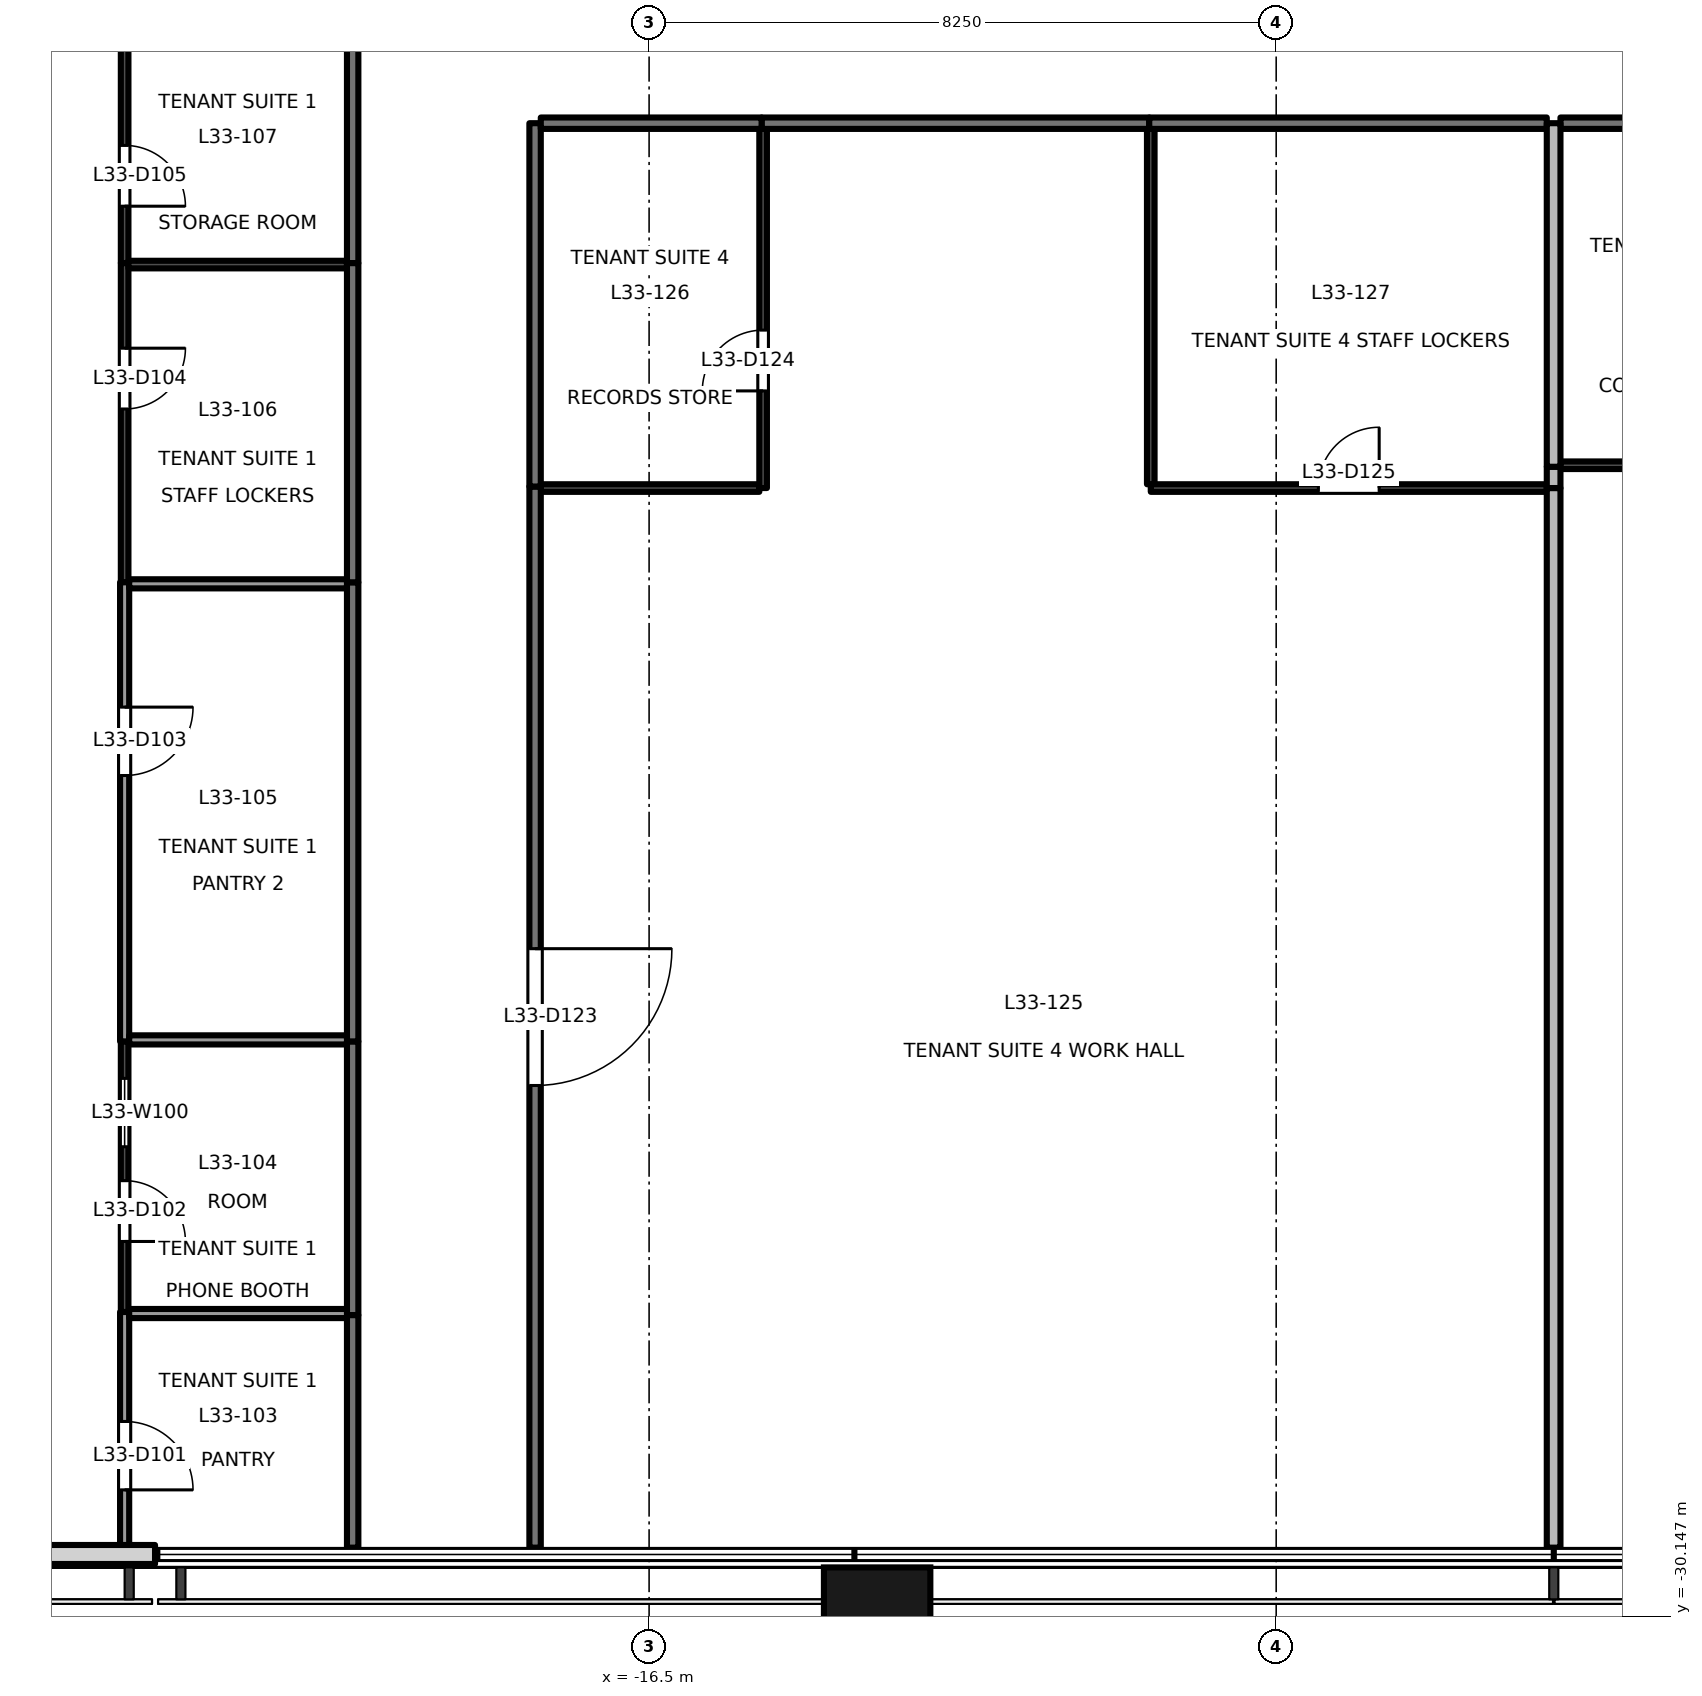
"""IFC4 building model, lengths in metres.
Left out: names, types, materials, properties, quantities, classifications, styles, units other than length and angle.
Written with IfcOpenShell. Run it as: python <this file> out.ifc"""

import sys

from ifc_helpers import new_model, si_unit, direction, frame, frame_2d, origin, origin_2d, place, context, subcontext, project, spatial, rectangle, extrude, element, fill, save


model = new_model("IFC4")
c1 = context("Model", 3, precision=1e-05, world=origin(), true_north=direction((0.0, 1.0)))
c2 = subcontext(c1, "Body", "Model", "MODEL_VIEW")
j1 = project(units=[si_unit("LENGTHUNIT", "METRE"), si_unit("PLANEANGLEUNIT", "RADIAN")], contexts=[c1])
p1 = place(None, origin())
s1 = spatial("IfcSite", under=j1, at=p1, CompositionType="ELEMENT")
p2 = place(p1, origin())
s2 = spatial("IfcBuilding", under=s1, at=p2, CompositionType="ELEMENT")
p3 = place(p2, frame((0.0, 0.0, 146.1)))
s3 = spatial("IfcBuildingStorey", under=s2, at=p3, CompositionType="ELEMENT", Elevation=146.1)
p4 = place(p3, frame((-13.5, -30.4, -0.2), z_axis=(0.0, 0.0, 1.0), x_axis=(1.0, 0.0, 0.0)))
e1 = element("IfcColumn", 1, at=p4, inside=s3, PredefinedType="COLUMN", context=c2, shape_type="SweptSolid", body=[
    extrude(rectangle(XDim=1.4, YDim=1.8, at=origin_2d()), origin(), (0.0, 0.0, 1.0), 4.0),
])
p5 = place(p3, frame((-25.955, -29.33, 0.0), z_axis=(0.0, 0.0, 1.0), x_axis=(1.0, 0.0, 0.0)))
e2 = element("IfcWall", 2, at=p5, inside=s3, PredefinedType="SOLIDWALL", context=c2, shape_type="SweptSolid", body=[
    extrude(rectangle(XDim=2.955, YDim=0.25, at=frame_2d((1.478, 0.0))), origin(), (0.0, 0.0, 1.0), 3.8),
])
p6 = place(p3, frame((-20.4, -29.24, 0.0), z_axis=(0.0, 0.0, 1.0), x_axis=(0.0, 1.0, 0.0)))
e3 = element("IfcWall", 3, at=p6, inside=s3, PredefinedType="PARTITIONING", context=c2, shape_type="SweptSolid", body=[
    extrude(rectangle(XDim=3.06, YDim=0.15, at=frame_2d((1.53, 0.0))), origin(), (0.0, 0.0, 1.0), 3.8),
])
p7 = place(p3, frame((-20.4, -26.18, 0.0), z_axis=(0.0, 0.0, 1.0), x_axis=(0.0, 1.0, 0.0)))
e4 = element("IfcWall", 4, at=p7, inside=s3, PredefinedType="PARTITIONING", context=c2, shape_type="SweptSolid", body=[
    extrude(rectangle(XDim=3.6, YDim=0.15, at=frame_2d((1.8, 0.0))), origin(), (0.0, 0.0, 1.0), 3.8),
])
p8 = place(p3, frame((-20.4, -22.58, 0.0), z_axis=(0.0, 0.0, 1.0), x_axis=(0.0, 1.0, 0.0)))
e5 = element("IfcWall", 5, at=p8, inside=s3, PredefinedType="PARTITIONING", context=c2, shape_type="SweptSolid", body=[
    extrude(rectangle(XDim=6.04, YDim=0.15, at=frame_2d((3.02, 0.0))), origin(), (0.0, 0.0, 1.0), 3.8),
])
p9 = place(p3, frame((-20.4, -16.54, 0.0), z_axis=(0.0, 0.0, 1.0), x_axis=(0.0, 1.0, 0.0)))
e6 = element("IfcWall", 6, at=p9, inside=s3, PredefinedType="PARTITIONING", context=c2, shape_type="SweptSolid", body=[
    extrude(rectangle(XDim=4.2, YDim=0.15, at=frame_2d((2.1, 0.0))), origin(), (0.0, 0.0, 1.0), 3.8),
])
p10 = place(p3, frame((-20.4, -12.34, 0.0), z_axis=(0.0, 0.0, 1.0), x_axis=(0.0, 1.0, 0.0)))
e7 = element("IfcWall", 7, at=p10, inside=s3, PredefinedType="PARTITIONING", context=c2, shape_type="SweptSolid", body=[
    extrude(rectangle(XDim=2.96, YDim=0.15, at=frame_2d((1.48, 0.0))), origin(), (0.0, 0.0, 1.0), 3.8),
])
p11 = place(p3, frame((-18.0, -15.28, 0.0), z_axis=(0.0, 0.0, 1.0), x_axis=(0.0, -1.0, 0.0)))
e8 = element("IfcWall", 8, at=p11, inside=s3, PredefinedType="PARTITIONING", context=c2, shape_type="SweptSolid", body=[
    extrude(rectangle(XDim=13.96, YDim=0.15, at=frame_2d((6.98, 0.0))), origin(), (0.0, 0.0, 1.0), 3.8),
])
p12 = place(p11, frame((6.08, 0.0, 0.0)))
e9 = element("IfcOpeningElement", 9, at=p12, cuts=e8, PredefinedType="OPENING", context=c2, shape_type="SweptSolid", body=[
    extrude(rectangle(XDim=1.8, YDim=2.1, at=frame_2d((0.9, 1.05))), frame((0.0, 0.085, 0.0), z_axis=(0.0, -1.0, 0.0), x_axis=(1.0, 0.0, 0.0)), (0.0, 0.0, 1.0), 0.171),
])
p13 = place(p3, frame((-9.92, -10.5, 0.0), z_axis=(0.0, 0.0, 1.0), x_axis=(-1.0, 0.0, 0.0)))
e10 = element("IfcWall", 10, at=p13, inside=s3, PredefinedType="PARTITIONING", context=c2, shape_type="SweptSolid", body=[
    extrude(rectangle(XDim=5.1, YDim=0.15, at=frame_2d((2.55, 0.0))), origin(), (0.0, 0.0, 1.0), 2.9),
])
p14 = place(p3, frame((-18.0, -10.5, 0.0), z_axis=(0.0, 0.0, 1.0), x_axis=(0.0, -1.0, 0.0)))
e11 = element("IfcWall", 11, at=p14, inside=s3, PredefinedType="PARTITIONING", context=c2, shape_type="SweptSolid", body=[
    extrude(rectangle(XDim=4.78, YDim=0.15, at=frame_2d((2.39, 0.0))), origin(), (0.0, 0.0, 1.0), 3.8),
])
p15 = place(p3, frame((-15.02, -10.5, 0.0), z_axis=(0.0, 0.0, 1.0), x_axis=(-1.0, 0.0, 0.0)))
e12 = element("IfcWall", 12, at=p15, inside=s3, PredefinedType="PARTITIONING", context=c2, shape_type="SweptSolid", body=[
    extrude(rectangle(XDim=2.905, YDim=0.15, at=frame_2d((1.453, 0.0))), origin(), (0.0, 0.0, 1.0), 3.8),
])
p16 = place(p3, frame((-4.69, -10.5, 0.0), z_axis=(0.0, 0.0, 1.0), x_axis=(-1.0, 0.0, 0.0)))
e13 = element("IfcWall", 13, at=p16, inside=s3, PredefinedType="PARTITIONING", context=c2, shape_type="SweptSolid", body=[
    extrude(rectangle(XDim=5.23, YDim=0.15, at=frame_2d((2.615, 0.0))), origin(), (0.0, 0.0, 1.0), 2.9),
])
p17 = place(p3, frame((-1.62, -10.5, 0.0), z_axis=(0.0, 0.0, 1.0), x_axis=(-1.0, 0.0, 0.0)))
e14 = element("IfcWall", 14, at=p17, inside=s3, PredefinedType="PARTITIONING", context=c2, shape_type="SweptSolid", body=[
    extrude(rectangle(XDim=2.89, YDim=0.15, at=frame_2d((1.445, 0.0))), origin(), (0.0, 0.0, 1.0), 2.9),
])
p18 = place(p3, frame((-23.4, -26.14, 0.0), z_axis=(0.0, 0.0, 1.0), x_axis=(0.0, -1.0, 0.0)))
e15 = element("IfcWall", 15, at=p18, inside=s3, PredefinedType="PARTITIONING", context=c2, shape_type="SweptSolid", body=[
    extrude(rectangle(XDim=3.1, YDim=0.12, at=frame_2d((1.55, 0.0))), origin(), (0.0, 0.0, 1.0), 3.8),
])
p19 = place(p18, frame((1.44, 0.0, 0.0)))
e16 = element("IfcOpeningElement", 16, at=p19, cuts=e15, PredefinedType="OPENING", context=c2, shape_type="SweptSolid", body=[
    extrude(rectangle(XDim=0.9, YDim=2.1, at=frame_2d((0.45, 1.05))), frame((0.0, 0.071, 0.0), z_axis=(0.0, -1.0, 0.0), x_axis=(1.0, 0.0, 0.0)), (0.0, 0.0, 1.0), 0.141),
])
p20 = place(p3, frame((-23.4, -22.58, 0.0), z_axis=(0.0, 0.0, 1.0), x_axis=(0.0, -1.0, 0.0)))
e17 = element("IfcWall", 17, at=p20, inside=s3, PredefinedType="PARTITIONING", context=c2, shape_type="SweptSolid", body=[
    extrude(rectangle(XDim=3.56, YDim=0.1, at=frame_2d((1.78, 0.0))), origin(), (0.0, 0.0, 1.0), 3.8),
])
p21 = place(p20, frame((1.832, 0.0, 0.0)))
e18 = element("IfcOpeningElement", 18, at=p21, cuts=e17, PredefinedType="OPENING", context=c2, shape_type="SweptSolid", body=[
    extrude(rectangle(XDim=0.8, YDim=2.1, at=frame_2d((0.4, 1.05))), frame((0.0, 0.061, 0.0), z_axis=(0.0, -1.0, 0.0), x_axis=(1.0, 0.0, 0.0)), (0.0, 0.0, 1.0), 0.121),
])
p22 = place(p20, frame((0.486, 0.0, 0.9)))
e19 = element("IfcOpeningElement", 19, at=p22, cuts=e17, PredefinedType="OPENING", context=c2, shape_type="SweptSolid", body=[
    extrude(rectangle(XDim=0.9, YDim=1.2, at=frame_2d((0.45, 0.6))), frame((0.0, 0.061, 0.0), z_axis=(0.0, -1.0, 0.0), x_axis=(1.0, 0.0, 0.0)), (0.0, 0.0, 1.0), 0.121),
])
p23 = place(p3, frame((-23.4, -16.54, 0.0), z_axis=(0.0, 0.0, 1.0), x_axis=(0.0, -1.0, 0.0)))
e20 = element("IfcWall", 20, at=p23, inside=s3, PredefinedType="PARTITIONING", context=c2, shape_type="SweptSolid", body=[
    extrude(rectangle(XDim=6.04, YDim=0.12, at=frame_2d((3.02, 0.0))), origin(), (0.0, 0.0, 1.0), 3.8),
])
p24 = place(p23, frame((1.642, 0.0, 0.0)))
e21 = element("IfcOpeningElement", 21, at=p24, cuts=e20, PredefinedType="OPENING", context=c2, shape_type="SweptSolid", body=[
    extrude(rectangle(XDim=0.9, YDim=2.1, at=frame_2d((0.45, 1.05))), frame((0.0, 0.071, 0.0), z_axis=(0.0, -1.0, 0.0), x_axis=(1.0, 0.0, 0.0)), (0.0, 0.0, 1.0), 0.141),
])
p25 = place(p3, frame((-23.4, -12.34, 0.0), z_axis=(0.0, 0.0, 1.0), x_axis=(0.0, -1.0, 0.0)))
e22 = element("IfcWall", 22, at=p25, inside=s3, PredefinedType="PARTITIONING", context=c2, shape_type="SweptSolid", body=[
    extrude(rectangle(XDim=4.2, YDim=0.1, at=frame_2d((2.1, 0.0))), origin(), (0.0, 0.0, 1.0), 3.8),
])
p26 = place(p25, frame((1.12, 0.0, 0.0)))
e23 = element("IfcOpeningElement", 23, at=p26, cuts=e22, PredefinedType="OPENING", context=c2, shape_type="SweptSolid", body=[
    extrude(rectangle(XDim=0.8, YDim=2.1, at=frame_2d((0.4, 1.05))), frame((0.0, 0.061, 0.0), z_axis=(0.0, -1.0, 0.0), x_axis=(1.0, 0.0, 0.0)), (0.0, 0.0, 1.0), 0.121),
])
p27 = place(p3, frame((-23.4, -9.38, 0.0), z_axis=(0.0, 0.0, 1.0), x_axis=(0.0, -1.0, 0.0)))
e24 = element("IfcWall", 24, at=p27, inside=s3, PredefinedType="PARTITIONING", context=c2, shape_type="SweptSolid", body=[
    extrude(rectangle(XDim=2.96, YDim=0.1, at=frame_2d((1.48, 0.0))), origin(), (0.0, 0.0, 1.0), 3.8),
])
p28 = place(p27, frame((1.412, 0.0, 0.0)))
e25 = element("IfcOpeningElement", 25, at=p28, cuts=e24, PredefinedType="OPENING", context=c2, shape_type="SweptSolid", body=[
    extrude(rectangle(XDim=0.8, YDim=2.1, at=frame_2d((0.4, 1.05))), frame((0.0, 0.061, 0.0), z_axis=(0.0, -1.0, 0.0), x_axis=(1.0, 0.0, 0.0)), (0.0, 0.0, 1.0), 0.121),
])
for number, where, z_axis, x_axis in (
    (26, (-23.34, -26.16, 0.0), (0.0, 0.0, 1.0), (1.0, 0.0, 0.0)),
    (27, (-23.34, -22.56, 0.0), (0.0, 0.0, 1.0), (1.0, 0.0, 0.0)),
    (28, (-23.34, -16.56, 0.0), (0.0, 0.0, 1.0), (1.0, 0.0, 0.0)),
):
    element("IfcWall", number, at=place(p3, frame(where, z_axis=z_axis, x_axis=x_axis)), inside=s3, PredefinedType="PARTITIONING", context=c2, shape_type="SweptSolid", body=[
        extrude(rectangle(XDim=2.865, YDim=0.12, at=frame_2d((1.433, 0.0))), origin(), (0.0, 0.0, 1.0), 3.8),
    ])
for number, where, z_axis, x_axis in (
    (29, (-23.35, -12.36, 0.0), (0.0, 0.0, 1.0), (1.0, 0.0, 0.0)),
    (30, (-17.925, -15.3, 0.0), (0.0, 0.0, 1.0), (1.0, 0.0, 0.0)),
):
    element("IfcWall", number, at=place(p3, frame(where, z_axis=z_axis, x_axis=x_axis)), inside=s3, PredefinedType="PARTITIONING", context=c2, shape_type="SweptSolid", body=[
        extrude(rectangle(XDim=2.875, YDim=0.1, at=frame_2d((1.438, 0.0))), origin(), (0.0, 0.0, 1.0), 3.8),
    ])
p29 = place(p3, frame((-15.0, -15.3, 0.0), z_axis=(0.0, 0.0, 1.0), x_axis=(0.0, 1.0, 0.0)))
e31 = element("IfcWall", 31, at=p29, inside=s3, PredefinedType="PARTITIONING", context=c2, shape_type="SweptSolid", body=[
    extrude(rectangle(XDim=4.725, YDim=0.1, at=frame_2d((2.363, 0.0))), origin(), (0.0, 0.0, 1.0), 3.8),
])
p30 = place(p29, frame((1.278, 0.0, 0.0)))
e32 = element("IfcOpeningElement", 32, at=p30, cuts=e31, PredefinedType="OPENING", context=c2, shape_type="SweptSolid", body=[
    extrude(rectangle(XDim=0.8, YDim=2.1, at=frame_2d((0.4, 1.05))), frame((0.0, 0.061, 0.0), z_axis=(0.0, -1.0, 0.0), x_axis=(1.0, 0.0, 0.0)), (0.0, 0.0, 1.0), 0.121),
])
p31 = place(p3, frame((-9.9, -10.575, 0.0), z_axis=(0.0, 0.0, 1.0), x_axis=(0.0, -1.0, 0.0)))
e33 = element("IfcWall", 33, at=p31, inside=s3, PredefinedType="PARTITIONING", context=c2, shape_type="SweptSolid", body=[
    extrude(rectangle(XDim=4.675, YDim=0.1, at=frame_2d((2.337, 0.0))), origin(), (0.0, 0.0, 1.0), 3.8),
])
p32 = place(p3, frame((-9.9, -15.3, 0.0), z_axis=(0.0, 0.0, 1.0), x_axis=(1.0, 0.0, 0.0)))
e34 = element("IfcWall", 34, at=p32, inside=s3, PredefinedType="PARTITIONING", context=c2, shape_type="SweptSolid", body=[
    extrude(rectangle(XDim=5.21, YDim=0.1, at=frame_2d((2.605, 0.0))), origin(), (0.0, 0.0, 1.0), 2.9),
])
p33 = place(p32, frame((2.205, 0.0, 0.0)))
e35 = element("IfcOpeningElement", 35, at=p33, cuts=e34, PredefinedType="OPENING", context=c2, shape_type="SweptSolid", body=[
    extrude(rectangle(XDim=0.8, YDim=2.1, at=frame_2d((0.4, 1.05))), frame((0.0, 0.061, 0.0), z_axis=(0.0, -1.0, 0.0), x_axis=(1.0, 0.0, 0.0)), (0.0, 0.0, 1.0), 0.121),
])
p34 = place(p3, frame((-4.6, -15.3, 0.0), z_axis=(0.0, 0.0, 1.0), x_axis=(0.0, -1.0, 0.0)))
e36 = element("IfcWall", 36, at=p34, inside=s3, PredefinedType="PARTITIONING", context=c2, shape_type="SweptSolid", body=[
    extrude(rectangle(XDim=13.94, YDim=0.18, at=frame_2d((6.97, 0.0))), origin(), (0.0, 0.0, 1.0), 2.9),
])
p35 = place(p3, frame((-4.6, -15.02, 0.0), z_axis=(0.0, 0.0, 1.0), x_axis=(0.0, -1.0, 0.0)))
e37 = element("IfcWall", 37, at=p35, inside=s3, PredefinedType="PARTITIONING", context=c2, shape_type="SweptSolid", body=[
    extrude(rectangle(XDim=0.28, YDim=0.18, at=frame_2d((0.14, 0.0))), origin(), (0.0, 0.0, 1.0), 2.9),
])
p36 = place(p3, frame((-4.6, -10.5, 0.0), z_axis=(0.0, 0.0, 1.0), x_axis=(0.0, -1.0, 0.0)))
e38 = element("IfcWall", 38, at=p36, inside=s3, PredefinedType="PARTITIONING", context=c2, shape_type="SweptSolid", body=[
    extrude(rectangle(XDim=4.52, YDim=0.18, at=frame_2d((2.26, 0.0))), origin(), (0.0, 0.0, 1.0), 2.9),
])
p37 = place(p3, frame((-4.51, -15.0, 0.0), z_axis=(0.0, 0.0, 1.0), x_axis=(1.0, 0.0, 0.0)))
e39 = element("IfcWall", 39, at=p37, inside=s3, PredefinedType="PARTITIONING", context=c2, shape_type="SweptSolid", body=[
    extrude(rectangle(XDim=2.86, YDim=0.1, at=frame_2d((1.43, 0.0))), origin(), (0.0, 0.0, 1.0), 2.9),
])
p38 = place(p19, origin())
e40 = element("IfcDoor", 40, at=p38, inside=s3, OperationType="SINGLE_SWING_RIGHT", PredefinedType="DOOR", context=c2, shape_type="SweptSolid", body=[
    extrude(rectangle(XDim=0.9, YDim=2.1, at=frame_2d((0.45, 1.05))), frame((0.0, 0.025, 0.0), z_axis=(0.0, -1.0, 0.0), x_axis=(1.0, 0.0, 0.0)), (0.0, 0.0, 1.0), 0.05),
])
fill(e16, e40)
p39 = place(p21, origin())
e41 = element("IfcDoor", 41, at=p39, inside=s3, OperationType="SINGLE_SWING_RIGHT", PredefinedType="DOOR", context=c2, shape_type="SweptSolid", body=[
    extrude(rectangle(XDim=0.8, YDim=2.1, at=frame_2d((0.4, 1.05))), frame((0.0, 0.025, 0.0), z_axis=(0.0, -1.0, 0.0), x_axis=(1.0, 0.0, 0.0)), (0.0, 0.0, 1.0), 0.05),
])
fill(e18, e41)
p40 = place(p24, origin())
e42 = element("IfcDoor", 42, at=p40, inside=s3, OperationType="SINGLE_SWING_LEFT", PredefinedType="DOOR", context=c2, shape_type="SweptSolid", body=[
    extrude(rectangle(XDim=0.9, YDim=2.1, at=frame_2d((0.45, 1.05))), frame((0.0, 0.025, 0.0), z_axis=(0.0, -1.0, 0.0), x_axis=(1.0, 0.0, 0.0)), (0.0, 0.0, 1.0), 0.05),
])
fill(e21, e42)
p41 = place(p26, origin())
e43 = element("IfcDoor", 43, at=p41, inside=s3, OperationType="SINGLE_SWING_LEFT", PredefinedType="DOOR", context=c2, shape_type="SweptSolid", body=[
    extrude(rectangle(XDim=0.8, YDim=2.1, at=frame_2d((0.4, 1.05))), frame((0.0, 0.025, 0.0), z_axis=(0.0, -1.0, 0.0), x_axis=(1.0, 0.0, 0.0)), (0.0, 0.0, 1.0), 0.05),
])
fill(e23, e43)
p42 = place(p28, origin())
e44 = element("IfcDoor", 44, at=p42, inside=s3, OperationType="SINGLE_SWING_RIGHT", PredefinedType="DOOR", context=c2, shape_type="SweptSolid", body=[
    extrude(rectangle(XDim=0.8, YDim=2.1, at=frame_2d((0.4, 1.05))), frame((0.0, 0.025, 0.0), z_axis=(0.0, -1.0, 0.0), x_axis=(1.0, 0.0, 0.0)), (0.0, 0.0, 1.0), 0.05),
])
fill(e25, e44)
p43 = place(p12, origin())
e45 = element("IfcDoor", 45, at=p43, inside=s3, OperationType="DOUBLE_DOOR_SINGLE_SWING", PredefinedType="DOOR", context=c2, shape_type="SweptSolid", body=[
    extrude(rectangle(XDim=1.8, YDim=2.1, at=frame_2d((0.9, 1.05))), frame((0.0, 0.025, 0.0), z_axis=(0.0, -1.0, 0.0), x_axis=(1.0, 0.0, 0.0)), (0.0, 0.0, 1.0), 0.05),
])
fill(e9, e45)
p44 = place(p30, origin())
e46 = element("IfcDoor", 46, at=p44, inside=s3, OperationType="SINGLE_SWING_LEFT", PredefinedType="DOOR", context=c2, shape_type="SweptSolid", body=[
    extrude(rectangle(XDim=0.8, YDim=2.1, at=frame_2d((0.4, 1.05))), frame((0.0, 0.025, 0.0), z_axis=(0.0, -1.0, 0.0), x_axis=(1.0, 0.0, 0.0)), (0.0, 0.0, 1.0), 0.05),
])
fill(e32, e46)
p45 = place(p33, origin())
e47 = element("IfcDoor", 47, at=p45, inside=s3, OperationType="SINGLE_SWING_RIGHT", PredefinedType="DOOR", context=c2, shape_type="SweptSolid", body=[
    extrude(rectangle(XDim=0.8, YDim=2.1, at=frame_2d((0.4, 1.05))), frame((0.0, 0.025, 0.0), z_axis=(0.0, -1.0, 0.0), x_axis=(1.0, 0.0, 0.0)), (0.0, 0.0, 1.0), 0.05),
])
fill(e35, e47)
p46 = place(p22, origin())
e48 = element("IfcWindow", 48, at=p46, inside=s3, PartitioningType="SINGLE_PANEL", PredefinedType="WINDOW", context=c2, shape_type="SweptSolid", body=[
    extrude(rectangle(XDim=0.9, YDim=1.2, at=frame_2d((0.45, 0.6))), frame((0.0, 0.03, 0.0), z_axis=(0.0, -1.0, 0.0), x_axis=(1.0, 0.0, 0.0)), (0.0, 0.0, 1.0), 0.06),
])
fill(e19, e48)
save(model, sys.argv[1])
